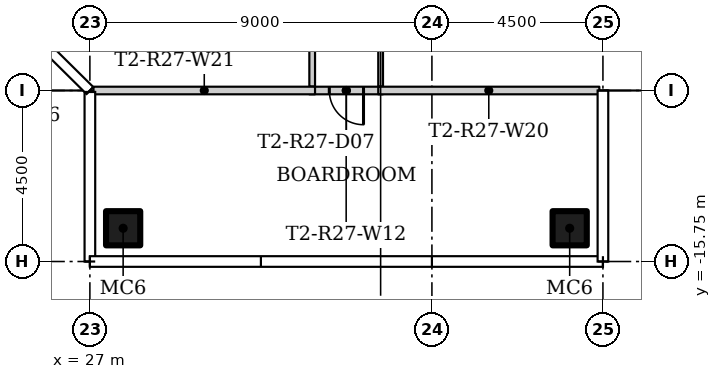
"""IFC4 building model, lengths in metres.
Left out: names, types, materials, properties, quantities, classifications, styles, units other than length and angle.
Written with IfcOpenShell. Run it as: python <this file> out.ifc"""

import sys

from ifc_helpers import new_model, si_unit, direction, frame, frame_2d, origin, origin_2d, place, context, subcontext, project, spatial, rectangle, hollow_rectangle, extrude, element, fill, save


model = new_model("IFC4")
c1 = context("Model", 3, precision=1e-05, world=origin(), true_north=direction((0.0, 1.0)))
c2 = subcontext(c1, "Body", "Model", "MODEL_VIEW")
j1 = project(units=[si_unit("LENGTHUNIT", "METRE"), si_unit("PLANEANGLEUNIT", "RADIAN")], contexts=[c1])
p1 = place(None, origin())
s1 = spatial("IfcSite", under=j1, at=p1, CompositionType="ELEMENT")
p2 = place(p1, origin())
s2 = spatial("IfcBuilding", under=s1, at=p2, CompositionType="ELEMENT")
p3 = place(p2, frame((0.0, 0.0, 249.9)))
s3 = spatial("IfcBuildingStorey", under=s2, at=p3, CompositionType="ELEMENT", Elevation=249.9)
for number, where in (
    (1, (39.625, -14.875, 0.0)),
    (2, (27.875, -14.875, 0.0)),
):
    element("IfcColumn", number, at=place(p3, frame(where)), inside=s3, PredefinedType="COLUMN", context=c2, shape_type="SweptSolid", body=[
        extrude(hollow_rectangle(XDim=0.9, YDim=0.9, WallThickness=0.036, at=origin_2d()), origin(), (0.0, 0.0, 1.0), 3.55),
    ])
p4 = place(p3, frame((32.85, -11.15, 0.0), z_axis=(0.0, 0.0, 1.0), x_axis=(0.0, 1.0, 0.0)))
e3 = element("IfcWall", 3, at=p4, inside=s3, PredefinedType="PARTITIONING", context=c2, shape_type="SweptSolid", body=[
    extrude(rectangle(XDim=11.125, YDim=0.15, at=frame_2d((5.562, 0.0))), origin(), (0.0, 0.0, 1.0), 3.55),
])
p5 = place(p4, frame((7.35, 0.0, 0.0)))
e4 = element("IfcOpeningElement", 4, at=p5, cuts=e3, PredefinedType="OPENING", context=c2, shape_type="SweptSolid", body=[
    extrude(rectangle(XDim=0.9, YDim=2.1, at=frame_2d((0.45, 1.05))), frame((0.0, 0.085, 0.0), z_axis=(0.0, -1.0, 0.0), x_axis=(1.0, 0.0, 0.0)), (0.0, 0.0, 1.0), 0.17),
])
p6 = place(p4, frame((1.4, 0.0, 0.0)))
e5 = element("IfcOpeningElement", 5, at=p6, cuts=e3, PredefinedType="OPENING", context=c2, shape_type="SweptSolid", body=[
    extrude(rectangle(XDim=1.5, YDim=2.1, at=frame_2d((0.75, 1.05))), frame((0.0, 0.085, 0.0), z_axis=(0.0, -1.0, 0.0), x_axis=(1.0, 0.0, 0.0)), (0.0, 0.0, 1.0), 0.17),
])
p7 = place(p3, frame((34.65, -6.825, 0.0), z_axis=(0.0, 0.0, 1.0), x_axis=(0.0, -1.0, 0.0)))
e6 = element("IfcWall", 6, at=p7, inside=s3, PredefinedType="PARTITIONING", context=c2, shape_type="SweptSolid", body=[
    extrude(rectangle(XDim=4.325, YDim=0.125, at=frame_2d((2.163, 0.0))), origin(), (0.0, 0.0, 1.0), 3.55),
])
p8 = place(p7, frame((1.725, 0.0, 0.0)))
e7 = element("IfcOpeningElement", 7, at=p8, cuts=e6, PredefinedType="OPENING", context=c2, shape_type="SweptSolid", body=[
    extrude(rectangle(XDim=0.9, YDim=2.1, at=frame_2d((0.45, 1.05))), frame((0.0, 0.073, 0.0), z_axis=(0.0, -1.0, 0.0), x_axis=(1.0, 0.0, 0.0)), (0.0, 0.0, 1.0), 0.145),
])
p9 = place(p3, frame((34.713, -11.25, 0.0), z_axis=(0.0, 0.0, 1.0), x_axis=(-1.0, 0.0, 0.0)))
e8 = element("IfcWall", 8, at=p9, inside=s3, PredefinedType="PARTITIONING", context=c2, shape_type="SweptSolid", body=[
    extrude(rectangle(XDim=1.938, YDim=0.2, at=frame_2d((0.969, 0.0))), origin(), (0.0, 0.0, 1.0), 3.55),
])
p10 = place(p9, frame((0.513, 0.0, 0.0)))
e9 = element("IfcOpeningElement", 9, at=p10, cuts=e8, PredefinedType="OPENING", context=c2, shape_type="SweptSolid", body=[
    extrude(rectangle(XDim=0.9, YDim=2.4, at=frame_2d((0.45, 1.2))), frame((0.0, 0.11, 0.0), z_axis=(0.0, -1.0, 0.0), x_axis=(1.0, 0.0, 0.0)), (0.0, 0.0, 1.0), 0.22),
])
p11 = place(p3, frame((34.588, -11.25, 0.0)))
e10 = element("IfcWall", 10, at=p11, inside=s3, PredefinedType="PARTITIONING", context=c2, shape_type="SweptSolid", body=[
    extrude(rectangle(XDim=5.817, YDim=0.2, at=frame_2d((2.909, 0.0))), origin(), (0.0, 0.0, 1.0), 3.55),
])
p12 = place(p3, frame((27.095, -11.25, 0.0)))
e11 = element("IfcWall", 11, at=p12, inside=s3, PredefinedType="PARTITIONING", context=c2, shape_type="SweptSolid", body=[
    extrude(rectangle(XDim=5.83, YDim=0.2, at=frame_2d((2.915, 0.0))), origin(), (0.0, 0.0, 1.0), 3.55),
])
p13 = place(p10, origin())
e12 = element("IfcDoor", 12, at=p13, inside=s3, OperationType="SINGLE_SWING_RIGHT", PredefinedType="DOOR", context=c2, shape_type="SweptSolid", body=[
    extrude(rectangle(XDim=0.9, YDim=2.4, at=frame_2d((0.45, 1.2))), frame((0.0, 0.025, 0.0), z_axis=(0.0, -1.0, 0.0), x_axis=(1.0, 0.0, 0.0)), (0.0, 0.0, 1.0), 0.05),
])
fill(e9, e12)
save(model, sys.argv[1])
